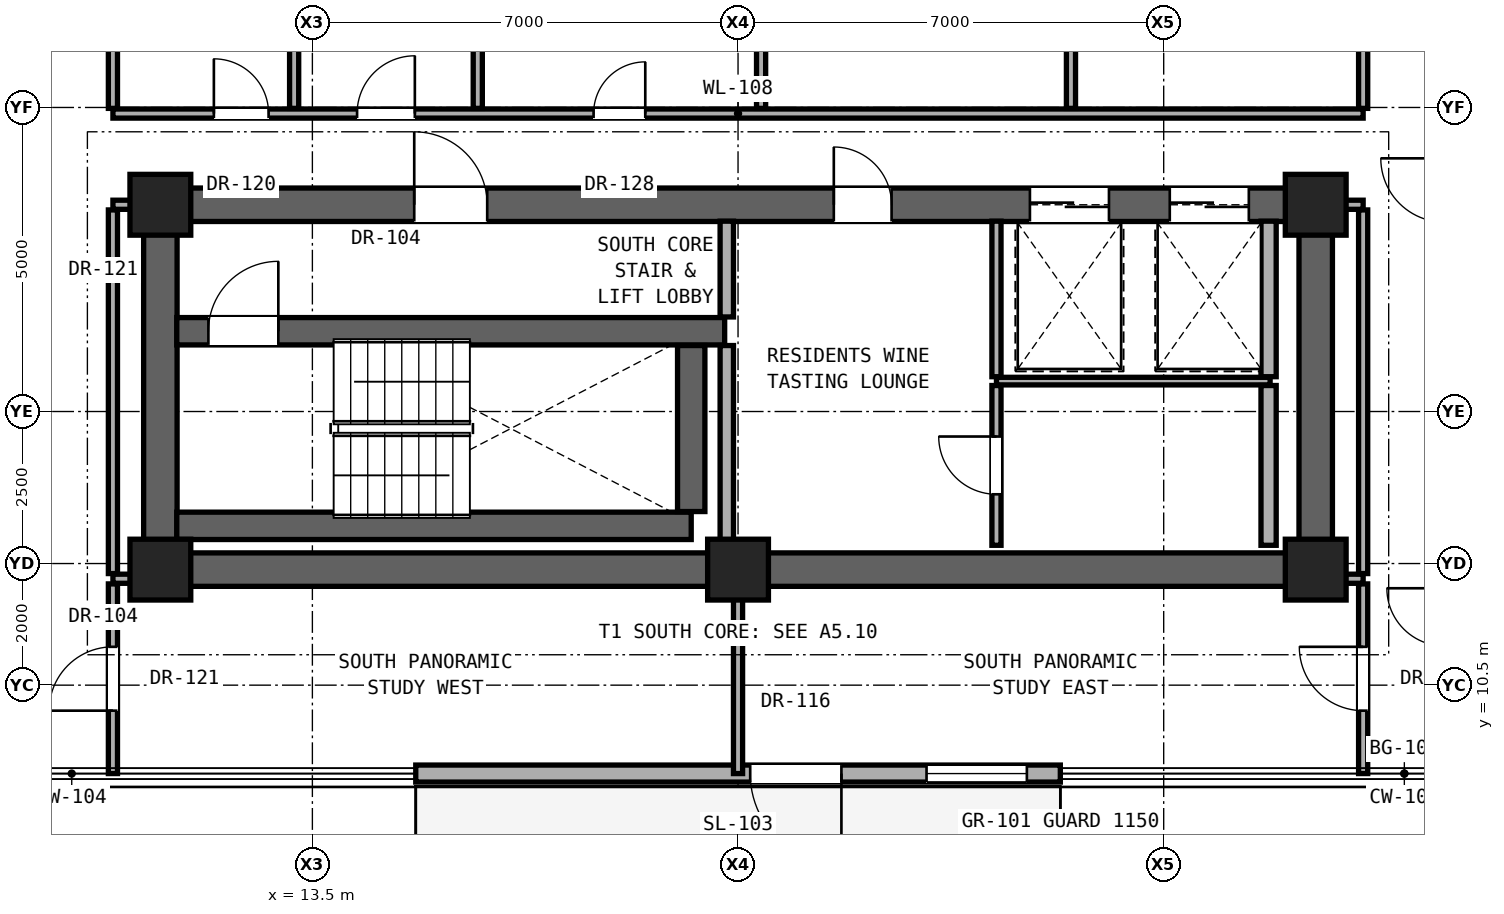
"""IFC4 building model, lengths in metres.
Left out: names, types, materials, properties, quantities, classifications, styles, units other than length and angle.
Written with IfcOpenShell. Run it as: python <this file> out.ifc"""

import sys

from ifc_helpers import new_model, si_unit, direction, frame, frame_2d, origin, origin_2d, place, context, subcontext, project, spatial, rectangle, extrude, element, fill, save


model = new_model("IFC4")
c1 = context("Model", 3, precision=1e-05, world=origin(), true_north=direction((0.0, 1.0)))
c2 = subcontext(c1, "Body", "Model", "MODEL_VIEW")
j1 = project(units=[si_unit("LENGTHUNIT", "METRE"), si_unit("PLANEANGLEUNIT", "RADIAN")], contexts=[c1])
p1 = place(None, origin())
s1 = spatial("IfcSite", under=j1, at=p1, CompositionType="ELEMENT")
p2 = place(p1, origin())
s2 = spatial("IfcBuilding", under=s1, at=p2, CompositionType="ELEMENT")
p3 = place(p2, frame((0.0, 0.0, 180.4)))
s3 = spatial("IfcBuildingStorey", under=s2, at=p3, CompositionType="ELEMENT", Elevation=180.4)
for number, where, z_axis, x_axis in (
    (1, (11.0, 12.4, 0.0), (0.0, 0.0, 1.0), (1.0, 0.0, 0.0)),
    (2, (20.5, 12.4, 0.0), (0.0, 0.0, 1.0), (1.0, 0.0, 0.0)),
    (3, (30.0, 12.4, 0.0), (0.0, 0.0, 1.0), (1.0, 0.0, 0.0)),
    (4, (11.0, 18.4, 0.0), (0.0, 0.0, 1.0), (1.0, 0.0, 0.0)),
    (5, (30.0, 18.4, 0.0), (0.0, 0.0, 1.0), (1.0, 0.0, 0.0)),
):
    element("IfcColumn", number, at=place(p3, frame(where, z_axis=z_axis, x_axis=x_axis)), inside=s3, PredefinedType="COLUMN", context=c2, shape_type="SweptSolid", body=[
        extrude(rectangle(XDim=1.0, YDim=1.0, at=origin_2d()), origin(), (0.0, 0.0, 1.0), 3.25),
    ])
p4 = place(p3, frame((11.0, 12.4, 0.0), z_axis=(0.0, 0.0, 1.0), x_axis=(1.0, 0.0, 0.0)))
e6 = element("IfcWall", 6, at=p4, inside=s3, PredefinedType="SHEAR", context=c2, shape_type="SweptSolid", body=[
    extrude(rectangle(XDim=19.0, YDim=0.55, at=frame_2d((9.5, 0.0))), origin(), (0.0, 0.0, 1.0), 3.05),
])
for number, where, z_axis, x_axis in (
    (7, (11.0, 12.4, 0.0), (0.0, 0.0, 1.0), (0.0, 1.0, 0.0)),
    (8, (30.0, 12.4, 0.0), (0.0, 0.0, 1.0), (0.0, 1.0, 0.0)),
):
    element("IfcWall", number, at=place(p3, frame(where, z_axis=z_axis, x_axis=x_axis)), inside=s3, PredefinedType="SHEAR", context=c2, shape_type="SweptSolid", body=[
        extrude(rectangle(XDim=6.0, YDim=0.55, at=frame_2d((3.0, 0.0))), origin(), (0.0, 0.0, 1.0), 3.05),
    ])
p5 = place(p3, frame((11.0, 18.4, 0.0), z_axis=(0.0, 0.0, 1.0), x_axis=(1.0, 0.0, 0.0)))
e9 = element("IfcWall", 9, at=p5, inside=s3, PredefinedType="SHEAR", context=c2, shape_type="SweptSolid", body=[
    extrude(rectangle(XDim=19.0, YDim=0.55, at=frame_2d((9.5, 0.0))), origin(), (0.0, 0.0, 1.0), 3.05),
])
p6 = place(p5, frame((4.175, 0.0, 0.0)))
e10 = element("IfcOpeningElement", 10, at=p6, cuts=e9, PredefinedType="OPENING", context=c2, shape_type="SweptSolid", body=[
    extrude(rectangle(XDim=1.2, YDim=2.25, at=frame_2d((0.6, 1.125))), frame((0.0, 0.285, 0.0), z_axis=(0.0, -1.0, 0.0), x_axis=(1.0, 0.0, 0.0)), (0.0, 0.0, 1.0), 0.57),
])
p7 = place(p5, frame((11.075, 0.0, 0.0)))
e11 = element("IfcOpeningElement", 11, at=p7, cuts=e9, PredefinedType="OPENING", context=c2, shape_type="SweptSolid", body=[
    extrude(rectangle(XDim=0.95, YDim=2.15, at=frame_2d((0.475, 1.075))), frame((0.0, 0.285, 0.0), z_axis=(0.0, -1.0, 0.0), x_axis=(1.0, 0.0, 0.0)), (0.0, 0.0, 1.0), 0.57),
])
p8 = place(p5, frame((14.3, 0.0, 0.0)))
e12 = element("IfcOpeningElement", 12, at=p8, cuts=e9, PredefinedType="OPENING", context=c2, shape_type="SweptSolid", body=[
    extrude(rectangle(XDim=1.3, YDim=2.3, at=frame_2d((0.65, 1.15))), frame((0.0, 0.285, 0.0), z_axis=(0.0, -1.0, 0.0), x_axis=(1.0, 0.0, 0.0)), (0.0, 0.0, 1.0), 0.57),
])
p9 = place(p5, frame((16.6, 0.0, 0.0)))
e13 = element("IfcOpeningElement", 13, at=p9, cuts=e9, PredefinedType="OPENING", context=c2, shape_type="SweptSolid", body=[
    extrude(rectangle(XDim=1.3, YDim=2.3, at=frame_2d((0.65, 1.15))), frame((0.0, 0.285, 0.0), z_axis=(0.0, -1.0, 0.0), x_axis=(1.0, 0.0, 0.0)), (0.0, 0.0, 1.0), 0.57),
])
p10 = place(p3, frame((25.8, 9.046, 0.0), z_axis=(0.0, 0.0, 1.0), x_axis=(-1.0, 0.0, 0.0)))
e14 = element("IfcWall", 14, at=p10, inside=s3, PredefinedType="SOLIDWALL", context=c2, shape_type="SweptSolid", body=[
    extrude(rectangle(XDim=10.6, YDim=0.28, at=frame_2d((5.3, 0.0))), origin(), (0.0, 0.0, 1.0), 3.01),
])
p11 = place(p10, frame((0.55, 0.0, 0.66)))
e15 = element("IfcOpeningElement", 15, at=p11, cuts=e14, PredefinedType="OPENING", context=c2, shape_type="SweptSolid", body=[
    extrude(rectangle(XDim=1.65, YDim=2.2, at=frame_2d((0.825, 1.1))), frame((0.0, 0.15, 0.0), z_axis=(0.0, -1.0, 0.0), x_axis=(1.0, 0.0, 0.0)), (0.0, 0.0, 1.0), 0.3),
])
p12 = place(p10, frame((3.6, 0.0, 0.0)))
e16 = element("IfcOpeningElement", 16, at=p12, cuts=e14, PredefinedType="OPENING", context=c2, shape_type="SweptSolid", body=[
    extrude(rectangle(XDim=1.5, YDim=2.3, at=frame_2d((0.75, 1.15))), frame((0.0, 0.15, 0.0), z_axis=(0.0, -1.0, 0.0), x_axis=(1.0, 0.0, 0.0)), (0.0, 0.0, 1.0), 0.3),
])
for number, where, z_axis, x_axis in (
    (17, (10.22, 12.25, 0.0), (0.0, 0.0, 1.0), (1.0, 0.0, 0.0)),
    (18, (30.27, 12.25, 0.0), (0.0, 0.0, 1.0), (1.0, 0.0, 0.0)),
):
    element("IfcWall", number, at=place(p3, frame(where, z_axis=z_axis, x_axis=x_axis)), inside=s3, PredefinedType="PARTITIONING", context=c2, shape_type="SweptSolid", body=[
        extrude(rectangle(XDim=0.51, YDim=0.15, at=frame_2d((0.255, 0.0))), origin(), (0.0, 0.0, 1.0), 3.05),
    ])
p13 = place(p3, frame((11.27, 13.12, 0.0), z_axis=(0.0, 0.0, 1.0), x_axis=(1.0, 0.0, 0.0)))
e19 = element("IfcWall", 19, at=p13, inside=s3, PredefinedType="SHEAR", context=c2, shape_type="SweptSolid", body=[
    extrude(rectangle(XDim=8.46, YDim=0.45, at=frame_2d((4.23, 0.0))), origin(), (0.0, 0.0, 1.0), 3.05),
])
p14 = place(p3, frame((24.75, 15.5, 0.0), z_axis=(0.0, 0.0, 1.0), x_axis=(1.0, 0.0, 0.0)))
e20 = element("IfcWall", 20, at=p14, inside=s3, PredefinedType="PARTITIONING", context=c2, shape_type="SweptSolid", body=[
    extrude(rectangle(XDim=4.5, YDim=0.125, at=frame_2d((2.25, 0.0))), origin(), (0.0, 0.0, 1.0), 3.05),
])
p15 = place(p3, frame((11.27, 16.32, 0.0), z_axis=(0.0, 0.0, 1.0), x_axis=(1.0, 0.0, 0.0)))
e21 = element("IfcWall", 21, at=p15, inside=s3, PredefinedType="SHEAR", context=c2, shape_type="SweptSolid", body=[
    extrude(rectangle(XDim=9.01, YDim=0.45, at=frame_2d((4.505, 0.0))), origin(), (0.0, 0.0, 1.0), 3.05),
])
p16 = place(p15, frame((0.52, 0.0, 0.0)))
e22 = element("IfcOpeningElement", 22, at=p16, cuts=e21, PredefinedType="OPENING", context=c2, shape_type="SweptSolid", body=[
    extrude(rectangle(XDim=1.15, YDim=2.2, at=frame_2d((0.575, 1.1))), frame((0.0, 0.235, 0.0), z_axis=(0.0, -1.0, 0.0), x_axis=(1.0, 0.0, 0.0)), (0.0, 0.0, 1.0), 0.47),
])
for number, where, z_axis, x_axis in (
    (23, (10.22, 18.4, 0.0), (0.0, 0.0, 1.0), (1.0, 0.0, 0.0)),
    (24, (30.27, 18.4, 0.0), (0.0, 0.0, 1.0), (1.0, 0.0, 0.0)),
):
    element("IfcWall", number, at=place(p3, frame(where, z_axis=z_axis, x_axis=x_axis)), inside=s3, PredefinedType="PARTITIONING", context=c2, shape_type="SweptSolid", body=[
        extrude(rectangle(XDim=0.51, YDim=0.15, at=frame_2d((0.255, 0.0))), origin(), (0.0, 0.0, 1.0), 2.442),
    ])
p17 = place(p3, frame((10.22, 19.9, 0.0), z_axis=(0.0, 0.0, 1.0), x_axis=(1.0, 0.0, 0.0)))
e25 = element("IfcWall", 25, at=p17, inside=s3, PredefinedType="PARTITIONING", context=c2, shape_type="SweptSolid", body=[
    extrude(rectangle(XDim=20.56, YDim=0.15, at=frame_2d((10.28, 0.0))), origin(), (0.0, 0.0, 1.0), 2.186),
])
p18 = place(p17, frame((1.66, 0.0, 0.0)))
e26 = element("IfcOpeningElement", 26, at=p18, cuts=e25, PredefinedType="OPENING", context=c2, shape_type="SweptSolid", body=[
    extrude(rectangle(XDim=0.9, YDim=2.1, at=frame_2d((0.45, 1.05))), frame((0.0, 0.085, 0.0), z_axis=(0.0, -1.0, 0.0), x_axis=(1.0, 0.0, 0.0)), (0.0, 0.0, 1.0), 0.17),
])
p19 = place(p17, frame((4.015, 0.0, 0.0)))
e27 = element("IfcOpeningElement", 27, at=p19, cuts=e25, PredefinedType="OPENING", context=c2, shape_type="SweptSolid", body=[
    extrude(rectangle(XDim=0.95, YDim=2.15, at=frame_2d((0.475, 1.075))), frame((0.0, 0.085, 0.0), z_axis=(0.0, -1.0, 0.0), x_axis=(1.0, 0.0, 0.0)), (0.0, 0.0, 1.0), 0.17),
])
p20 = place(p17, frame((7.905, 0.0, 0.0)))
e28 = element("IfcOpeningElement", 28, at=p20, cuts=e25, PredefinedType="OPENING", context=c2, shape_type="SweptSolid", body=[
    extrude(rectangle(XDim=0.85, YDim=2.01, at=frame_2d((0.425, 1.005))), frame((0.0, 0.085, 0.0), z_axis=(0.0, -1.0, 0.0), x_axis=(1.0, 0.0, 0.0)), (0.0, 0.0, 1.0), 0.17),
])
p21 = place(p3, frame((10.22, 9.046, 0.0), z_axis=(0.0, 0.0, 1.0), x_axis=(0.0, 1.0, 0.0)))
e29 = element("IfcWall", 29, at=p21, inside=s3, PredefinedType="PARTITIONING", context=c2, shape_type="SweptSolid", body=[
    extrude(rectangle(XDim=3.119, YDim=0.15, at=frame_2d((1.56, 0.0))), origin(), (0.0, 0.0, 1.0), 3.05),
])
p22 = place(p21, frame((1.034, 0.0, 0.0)))
e30 = element("IfcOpeningElement", 30, at=p22, cuts=e29, PredefinedType="OPENING", context=c2, shape_type="SweptSolid", body=[
    extrude(rectangle(XDim=1.05, YDim=2.2, at=frame_2d((0.525, 1.1))), frame((0.0, 0.085, 0.0), z_axis=(0.0, -1.0, 0.0), x_axis=(1.0, 0.0, 0.0)), (0.0, 0.0, 1.0), 0.17),
])
p23 = place(p3, frame((10.22, 12.335, 0.0), z_axis=(0.0, 0.0, 1.0), x_axis=(0.0, 1.0, 0.0)))
e31 = element("IfcWall", 31, at=p23, inside=s3, PredefinedType="PARTITIONING", context=c2, shape_type="SweptSolid", body=[
    extrude(rectangle(XDim=5.98, YDim=0.15, at=frame_2d((2.99, 0.0))), origin(), (0.0, 0.0, 1.0), 2.442),
])
for number, where, z_axis, x_axis in (
    (32, (10.22, 19.985, 0.0), (0.0, 0.0, 1.0), (0.0, 1.0, 0.0)),
    (33, (13.2, 19.985, 0.0), (0.0, 0.0, 1.0), (0.0, 1.0, 0.0)),
    (34, (16.22, 19.985, 0.0), (0.0, 0.0, 1.0), (0.0, 1.0, 0.0)),
):
    element("IfcWall", number, at=place(p3, frame(where, z_axis=z_axis, x_axis=x_axis)), inside=s3, PredefinedType="PARTITIONING", context=c2, shape_type="SweptSolid", body=[
        extrude(rectangle(XDim=2.78, YDim=0.15, at=frame_2d((1.39, 0.0))), origin(), (0.0, 0.0, 1.0), 3.05),
    ])
p24 = place(p3, frame((19.73, 13.355, 0.0), z_axis=(0.0, 0.0, 1.0), x_axis=(0.0, 1.0, 0.0)))
e35 = element("IfcWall", 35, at=p24, inside=s3, PredefinedType="SHEAR", context=c2, shape_type="SweptSolid", body=[
    extrude(rectangle(XDim=2.73, YDim=0.45, at=frame_2d((1.365, 0.0))), origin(), (0.0, 0.0, 1.0), 3.05),
])
p25 = place(p3, frame((20.315, 12.8, 0.0), z_axis=(0.0, 0.0, 1.0), x_axis=(0.0, 1.0, 0.0)))
e36 = element("IfcWall", 36, at=p25, inside=s3, PredefinedType="SOLIDWALL", context=c2, shape_type="SweptSolid", body=[
    extrude(rectangle(XDim=3.285, YDim=0.22, at=frame_2d((1.643, 0.0))), origin(), (0.0, 0.0, 1.0), 3.05),
])
p26 = place(p3, frame((20.315, 16.555, 0.0), z_axis=(0.0, 0.0, 1.0), x_axis=(0.0, 1.0, 0.0)))
e37 = element("IfcWall", 37, at=p26, inside=s3, PredefinedType="SOLIDWALL", context=c2, shape_type="SweptSolid", body=[
    extrude(rectangle(XDim=1.575, YDim=0.22, at=frame_2d((0.788, 0.0))), origin(), (0.0, 0.0, 1.0), 3.05),
])
p27 = place(p3, frame((20.5, 9.046, 0.0), z_axis=(0.0, 0.0, 1.0), x_axis=(0.0, 1.0, 0.0)))
e38 = element("IfcWall", 38, at=p27, inside=s3, PredefinedType="PARTITIONING", context=c2, shape_type="SweptSolid", body=[
    extrude(rectangle(XDim=3.084, YDim=0.15, at=frame_2d((1.542, 0.0))), origin(), (0.0, 0.0, 1.0), 3.05),
])
p28 = place(p3, frame((20.879, 19.985, 0.0), z_axis=(0.0, 0.0, 1.0), x_axis=(0.0, 1.0, 0.0)))
e39 = element("IfcWall", 39, at=p28, inside=s3, PredefinedType="PARTITIONING", context=c2, shape_type="SweptSolid", body=[
    extrude(rectangle(XDim=13.03, YDim=0.15, at=frame_2d((6.515, 0.0))), origin(), (0.0, 0.0, 1.0), 2.186),
])
p29 = place(p3, frame((24.75, 12.8, 0.0), z_axis=(0.0, 0.0, 1.0), x_axis=(0.0, 1.0, 0.0)))
e40 = element("IfcWall", 40, at=p29, inside=s3, PredefinedType="PARTITIONING", context=c2, shape_type="SweptSolid", body=[
    extrude(rectangle(XDim=2.627, YDim=0.15, at=frame_2d((1.314, 0.0))), origin(), (0.0, 0.0, 1.0), 3.05),
])
p30 = place(p29, frame((0.839, 0.0, 0.0)))
e41 = element("IfcOpeningElement", 41, at=p30, cuts=e40, PredefinedType="OPENING", context=c2, shape_type="SweptSolid", body=[
    extrude(rectangle(XDim=0.95, YDim=2.15, at=frame_2d((0.475, 1.075))), frame((0.0, 0.085, 0.0), z_axis=(0.0, -1.0, 0.0), x_axis=(1.0, 0.0, 0.0)), (0.0, 0.0, 1.0), 0.17),
])
p31 = place(p3, frame((24.75, 15.573, 0.0), z_axis=(0.0, 0.0, 1.0), x_axis=(0.0, 1.0, 0.0)))
e42 = element("IfcWall", 42, at=p31, inside=s3, PredefinedType="PARTITIONING", context=c2, shape_type="SweptSolid", body=[
    extrude(rectangle(XDim=2.557, YDim=0.15, at=frame_2d((1.279, 0.0))), origin(), (0.0, 0.0, 1.0), 3.05),
])
p32 = place(p3, frame((25.975, 19.985, 0.0), z_axis=(0.0, 0.0, 1.0), x_axis=(0.0, 1.0, 0.0)))
e43 = element("IfcWall", 43, at=p32, inside=s3, PredefinedType="PARTITIONING", context=c2, shape_type="SweptSolid", body=[
    extrude(rectangle(XDim=13.03, YDim=0.15, at=frame_2d((6.515, 0.0))), origin(), (0.0, 0.0, 1.0), 2.186),
])
p33 = place(p3, frame((29.225, 12.8, 0.0), z_axis=(0.0, 0.0, 1.0), x_axis=(0.0, 1.0, 0.0)))
e44 = element("IfcWall", 44, at=p33, inside=s3, PredefinedType="SOLIDWALL", context=c2, shape_type="SweptSolid", body=[
    extrude(rectangle(XDim=2.627, YDim=0.25, at=frame_2d((1.314, 0.0))), origin(), (0.0, 0.0, 1.0), 3.05),
])
p34 = place(p3, frame((29.225, 15.573, 0.0), z_axis=(0.0, 0.0, 1.0), x_axis=(0.0, 1.0, 0.0)))
e45 = element("IfcWall", 45, at=p34, inside=s3, PredefinedType="SOLIDWALL", context=c2, shape_type="SweptSolid", body=[
    extrude(rectangle(XDim=2.557, YDim=0.25, at=frame_2d((1.279, 0.0))), origin(), (0.0, 0.0, 1.0), 3.05),
])
p35 = place(p3, frame((30.78, 9.046, 0.0), z_axis=(0.0, 0.0, 1.0), x_axis=(0.0, 1.0, 0.0)))
e46 = element("IfcWall", 46, at=p35, inside=s3, PredefinedType="PARTITIONING", context=c2, shape_type="SweptSolid", body=[
    extrude(rectangle(XDim=3.119, YDim=0.15, at=frame_2d((1.56, 0.0))), origin(), (0.0, 0.0, 1.0), 3.05),
])
p36 = place(p35, frame((1.034, 0.0, 0.0)))
e47 = element("IfcOpeningElement", 47, at=p36, cuts=e46, PredefinedType="OPENING", context=c2, shape_type="SweptSolid", body=[
    extrude(rectangle(XDim=1.05, YDim=2.2, at=frame_2d((0.525, 1.1))), frame((0.0, 0.085, 0.0), z_axis=(0.0, -1.0, 0.0), x_axis=(1.0, 0.0, 0.0)), (0.0, 0.0, 1.0), 0.17),
])
p37 = place(p3, frame((30.78, 12.335, 0.0), z_axis=(0.0, 0.0, 1.0), x_axis=(0.0, 1.0, 0.0)))
e48 = element("IfcWall", 48, at=p37, inside=s3, PredefinedType="PARTITIONING", context=c2, shape_type="SweptSolid", body=[
    extrude(rectangle(XDim=5.98, YDim=0.15, at=frame_2d((2.99, 0.0))), origin(), (0.0, 0.0, 1.0), 2.442),
])
p38 = place(p3, frame((30.78, 19.985, 0.0), z_axis=(0.0, 0.0, 1.0), x_axis=(0.0, 1.0, 0.0)))
e49 = element("IfcWall", 49, at=p38, inside=s3, PredefinedType="PARTITIONING", context=c2, shape_type="SweptSolid", body=[
    extrude(rectangle(XDim=13.03, YDim=0.15, at=frame_2d((6.515, 0.0))), origin(), (0.0, 0.0, 1.0), 2.346),
])
p39 = place(p11, origin())
e50 = element("IfcWindow", 50, at=p39, inside=s3, PartitioningType="SINGLE_PANEL", PredefinedType="WINDOW", context=c2, shape_type="SweptSolid", body=[
    extrude(rectangle(XDim=1.65, YDim=2.2, at=frame_2d((0.825, 1.1))), frame((0.0, 0.03, 0.0), z_axis=(0.0, -1.0, 0.0), x_axis=(1.0, 0.0, 0.0)), (0.0, 0.0, 1.0), 0.06),
])
fill(e15, e50)
p40 = place(p12, origin())
e51 = element("IfcDoor", 51, at=p40, inside=s3, OperationType="SINGLE_SWING_LEFT", PredefinedType="DOOR", context=c2, shape_type="SweptSolid", body=[
    extrude(rectangle(XDim=1.5, YDim=2.3, at=frame_2d((0.75, 1.15))), frame((0.0, 0.025, 0.0), z_axis=(0.0, -1.0, 0.0), x_axis=(1.0, 0.0, 0.0)), (0.0, 0.0, 1.0), 0.05),
])
fill(e16, e51)
p41 = place(p6, origin())
e52 = element("IfcDoor", 52, at=p41, inside=s3, OperationType="SINGLE_SWING_LEFT", PredefinedType="DOOR", context=c2, shape_type="SweptSolid", body=[
    extrude(rectangle(XDim=1.2, YDim=2.25, at=frame_2d((0.6, 1.125))), frame((0.0, 0.025, 0.0), z_axis=(0.0, -1.0, 0.0), x_axis=(1.0, 0.0, 0.0)), (0.0, 0.0, 1.0), 0.05),
])
fill(e10, e52)
p42 = place(p16, origin())
e53 = element("IfcDoor", 53, at=p42, inside=s3, OperationType="SINGLE_SWING_RIGHT", PredefinedType="DOOR", context=c2, shape_type="SweptSolid", body=[
    extrude(rectangle(XDim=1.15, YDim=2.2, at=frame_2d((0.575, 1.1))), frame((0.0, 0.025, 0.0), z_axis=(0.0, -1.0, 0.0), x_axis=(1.0, 0.0, 0.0)), (0.0, 0.0, 1.0), 0.05),
])
fill(e22, e53)
p43 = place(p7, origin())
e54 = element("IfcDoor", 54, at=p43, inside=s3, OperationType="SINGLE_SWING_LEFT", PredefinedType="DOOR", context=c2, shape_type="SweptSolid", body=[
    extrude(rectangle(XDim=0.95, YDim=2.15, at=frame_2d((0.475, 1.075))), frame((0.0, 0.025, 0.0), z_axis=(0.0, -1.0, 0.0), x_axis=(1.0, 0.0, 0.0)), (0.0, 0.0, 1.0), 0.05),
])
fill(e11, e54)
p44 = place(p30, origin())
e55 = element("IfcDoor", 55, at=p44, inside=s3, OperationType="SINGLE_SWING_RIGHT", PredefinedType="DOOR", context=c2, shape_type="SweptSolid", body=[
    extrude(rectangle(XDim=0.95, YDim=2.15, at=frame_2d((0.475, 1.075))), frame((0.0, 0.025, 0.0), z_axis=(0.0, -1.0, 0.0), x_axis=(1.0, 0.0, 0.0)), (0.0, 0.0, 1.0), 0.05),
])
fill(e41, e55)
p45 = place(p18, origin())
e56 = element("IfcDoor", 56, at=p45, inside=s3, OperationType="SINGLE_SWING_LEFT", PredefinedType="DOOR", context=c2, shape_type="SweptSolid", body=[
    extrude(rectangle(XDim=0.9, YDim=2.1, at=frame_2d((0.45, 1.05))), frame((0.0, 0.025, 0.0), z_axis=(0.0, -1.0, 0.0), x_axis=(1.0, 0.0, 0.0)), (0.0, 0.0, 1.0), 0.05),
])
fill(e26, e56)
p46 = place(p19, origin())
e57 = element("IfcDoor", 57, at=p46, inside=s3, OperationType="SINGLE_SWING_RIGHT", PredefinedType="DOOR", context=c2, shape_type="SweptSolid", body=[
    extrude(rectangle(XDim=0.95, YDim=2.15, at=frame_2d((0.475, 1.075))), frame((0.0, 0.025, 0.0), z_axis=(0.0, -1.0, 0.0), x_axis=(1.0, 0.0, 0.0)), (0.0, 0.0, 1.0), 0.05),
])
fill(e27, e57)
p47 = place(p20, origin())
e58 = element("IfcDoor", 58, at=p47, inside=s3, OperationType="SINGLE_SWING_RIGHT", PredefinedType="DOOR", context=c2, shape_type="SweptSolid", body=[
    extrude(rectangle(XDim=0.85, YDim=2.01, at=frame_2d((0.425, 1.005))), frame((0.0, 0.025, 0.0), z_axis=(0.0, -1.0, 0.0), x_axis=(1.0, 0.0, 0.0)), (0.0, 0.0, 1.0), 0.05),
])
fill(e28, e58)
p48 = place(p22, origin())
e59 = element("IfcDoor", 59, at=p48, inside=s3, OperationType="SINGLE_SWING_LEFT", PredefinedType="DOOR", context=c2, shape_type="SweptSolid", body=[
    extrude(rectangle(XDim=1.05, YDim=2.2, at=frame_2d((0.525, 1.1))), frame((0.0, 0.025, 0.0), z_axis=(0.0, -1.0, 0.0), x_axis=(1.0, 0.0, 0.0)), (0.0, 0.0, 1.0), 0.05),
])
fill(e30, e59)
p49 = place(p36, origin())
e60 = element("IfcDoor", 60, at=p49, inside=s3, OperationType="SINGLE_SWING_RIGHT", PredefinedType="DOOR", context=c2, shape_type="SweptSolid", body=[
    extrude(rectangle(XDim=1.05, YDim=2.2, at=frame_2d((0.525, 1.1))), frame((0.0, 0.025, 0.0), z_axis=(0.0, -1.0, 0.0), x_axis=(1.0, 0.0, 0.0)), (0.0, 0.0, 1.0), 0.05),
])
fill(e47, e60)
p50 = place(p8, origin())
e61 = element("IfcDoor", 61, at=p50, inside=s3, OperationType="DOUBLE_DOOR_SLIDING", PredefinedType="DOOR", context=c2, shape_type="SweptSolid", body=[
    extrude(rectangle(XDim=1.3, YDim=2.3, at=frame_2d((0.65, 1.15))), frame((0.0, 0.025, 0.0), z_axis=(0.0, -1.0, 0.0), x_axis=(1.0, 0.0, 0.0)), (0.0, 0.0, 1.0), 0.05),
])
fill(e12, e61)
p51 = place(p9, origin())
e62 = element("IfcDoor", 62, at=p51, inside=s3, OperationType="DOUBLE_DOOR_SLIDING", PredefinedType="DOOR", context=c2, shape_type="SweptSolid", body=[
    extrude(rectangle(XDim=1.3, YDim=2.3, at=frame_2d((0.65, 1.15))), frame((0.0, 0.025, 0.0), z_axis=(0.0, -1.0, 0.0), x_axis=(1.0, 0.0, 0.0)), (0.0, 0.0, 1.0), 0.05),
])
fill(e13, e62)
save(model, sys.argv[1])
